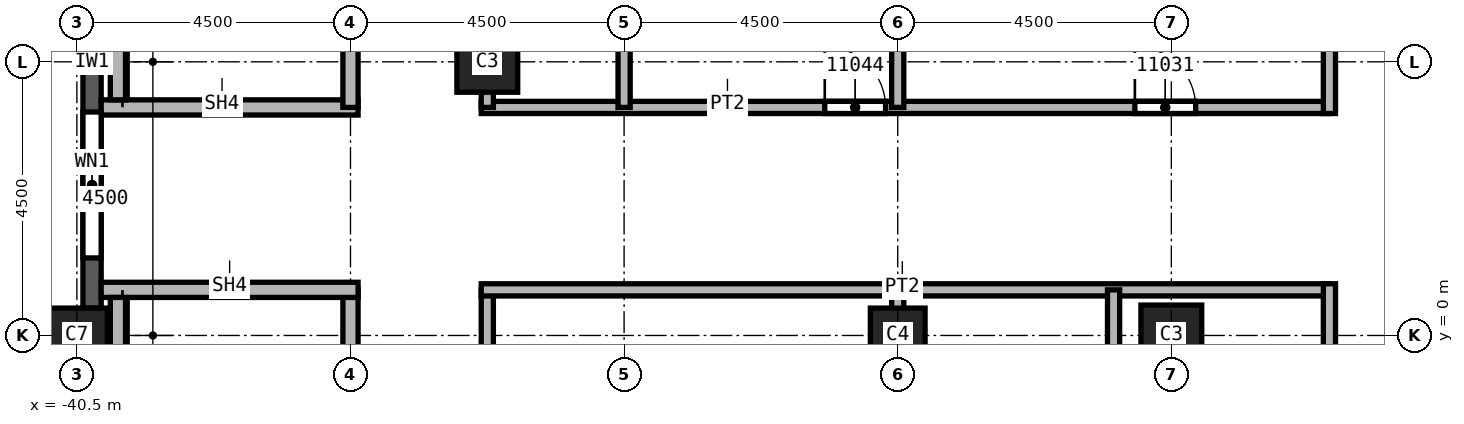
"""IFC4 building model, lengths in metres.
Left out: names, types, materials, properties, quantities, classifications, styles, units other than length and angle.
Written with IfcOpenShell. Run it as: python <this file> out.ifc"""

import sys

from ifc_helpers import new_model, si_unit, direction, frame, frame_2d, origin, origin_2d, place, context, subcontext, project, spatial, rectangle, extrude, element, fill, save


model = new_model("IFC4")
c1 = context("Model", 3, precision=1e-05, world=origin(), true_north=direction((0.0, 1.0)))
c2 = subcontext(c1, "Body", "Model", "MODEL_VIEW")
j1 = project(units=[si_unit("LENGTHUNIT", "METRE"), si_unit("PLANEANGLEUNIT", "RADIAN")], contexts=[c1])
p1 = place(None, origin())
s1 = spatial("IfcSite", under=j1, at=p1, CompositionType="ELEMENT")
p2 = place(p1, origin())
s2 = spatial("IfcBuilding", under=s1, at=p2, CompositionType="ELEMENT")
p3 = place(p2, frame((0.0, 0.0, 188.0)))
s3 = spatial("IfcBuildingStorey", under=s2, at=p3, CompositionType="ELEMENT", Elevation=188.0)
p4 = place(p3, frame((-40.5, 0.0, 0.0), z_axis=(0.0, 0.0, 1.0), x_axis=(0.0, 1.0, 0.0)))
e1 = element("IfcColumn", 1, at=p4, inside=s3, PredefinedType="COLUMN", context=c2, shape_type="SweptSolid", body=[
    extrude(rectangle(XDim=0.9, YDim=1.0, at=origin_2d()), origin(), (0.0, 0.0, 1.0), 3.72),
])
for number, where, z_axis, x_axis in (
    (2, (-33.75, 4.5, 0.0), (0.0, 0.0, 1.0), (1.0, 0.0, 0.0)),
    (3, (-22.5, 0.0, 0.0), (0.0, 0.0, 1.0), (1.0, 0.0, 0.0)),
):
    element("IfcColumn", number, at=place(p3, frame(where, z_axis=z_axis, x_axis=x_axis)), inside=s3, PredefinedType="COLUMN", context=c2, shape_type="SweptSolid", body=[
        extrude(rectangle(XDim=1.0, YDim=1.0, at=origin_2d()), origin(), (0.0, 0.0, 1.0), 3.72),
    ])
p5 = place(p3, frame((-27.0, 0.0, 0.0), z_axis=(0.0, 0.0, 1.0), x_axis=(1.0, 0.0, 0.0)))
e4 = element("IfcColumn", 4, at=p5, inside=s3, PredefinedType="COLUMN", context=c2, shape_type="SweptSolid", body=[
    extrude(rectangle(XDim=0.9, YDim=0.9, at=origin_2d()), origin(), (0.0, 0.0, 1.0), 3.72),
])
p6 = place(p3, frame((-40.25, 8.55, 0.0), z_axis=(0.0, 0.0, 1.0), x_axis=(0.0, -1.0, 0.0)))
e5 = element("IfcWall", 5, at=p6, inside=s3, PredefinedType="SOLIDWALL", context=c2, shape_type="SweptSolid", body=[
    extrude(rectangle(XDim=8.1, YDim=0.3, at=frame_2d((4.05, 0.0))), origin(), (0.0, 0.0, 1.0), 3.12),
])
p7 = place(p6, frame((0.825, 0.0, 0.8)))
e6 = element("IfcOpeningElement", 6, at=p7, cuts=e5, PredefinedType="OPENING", context=c2, shape_type="SweptSolid", body=[
    extrude(rectangle(XDim=2.4, YDim=1.95, at=frame_2d((1.2, 0.975))), frame((0.0, 0.15, 0.0), z_axis=(0.0, -1.0, 0.0), x_axis=(1.0, 0.0, 0.0)), (0.0, 0.0, 1.0), 0.3),
])
p8 = place(p6, frame((4.875, 0.0, 0.8)))
e7 = element("IfcOpeningElement", 7, at=p8, cuts=e5, PredefinedType="OPENING", context=c2, shape_type="SweptSolid", body=[
    extrude(rectangle(XDim=2.4, YDim=1.95, at=frame_2d((1.2, 0.975))), frame((0.0, 0.15, 0.0), z_axis=(0.0, -1.0, 0.0), x_axis=(1.0, 0.0, 0.0)), (0.0, 0.0, 1.0), 0.3),
])
p9 = place(p3, frame((-33.85, 3.75, 0.0), z_axis=(0.0, 0.0, 1.0), x_axis=(1.0, 0.0, 0.0)))
e8 = element("IfcWall", 8, at=p9, inside=s3, PredefinedType="PARTITIONING", context=c2, shape_type="SweptSolid", body=[
    extrude(rectangle(XDim=13.95, YDim=0.2, at=frame_2d((6.975, 0.0))), origin(), (0.0, 0.0, 1.0), 3.72),
])
p10 = place(p9, frame((10.75, 0.0, 0.0)))
e9 = element("IfcOpeningElement", 9, at=p10, cuts=e8, PredefinedType="OPENING", context=c2, shape_type="SweptSolid", body=[
    extrude(rectangle(XDim=1.0, YDim=2.1, at=frame_2d((0.5, 1.05))), frame((0.0, 0.1, 0.0), z_axis=(0.0, -1.0, 0.0), x_axis=(1.0, 0.0, 0.0)), (0.0, 0.0, 1.0), 0.2),
])
p11 = place(p9, frame((5.65, 0.0, 0.0)))
e10 = element("IfcOpeningElement", 10, at=p11, cuts=e8, PredefinedType="OPENING", context=c2, shape_type="SweptSolid", body=[
    extrude(rectangle(XDim=1.0, YDim=2.1, at=frame_2d((0.5, 1.05))), frame((0.0, 0.1, 0.0), z_axis=(0.0, -1.0, 0.0), x_axis=(1.0, 0.0, 0.0)), (0.0, 0.0, 1.0), 0.2),
])
p12 = place(p3, frame((-33.75, 0.75, 0.0), z_axis=(0.0, 0.0, 1.0), x_axis=(0.0, -1.0, 0.0)))
e11 = element("IfcWall", 11, at=p12, inside=s3, PredefinedType="PARTITIONING", context=c2, shape_type="SweptSolid", body=[
    extrude(rectangle(XDim=18.35, YDim=0.2, at=frame_2d((9.175, 0.0))), origin(), (0.0, 0.0, 1.0), 3.72),
])
p13 = place(p12, frame((3.25, 0.0, 0.0)))
e12 = element("IfcOpeningElement", 12, at=p13, cuts=e11, PredefinedType="OPENING", context=c2, shape_type="SweptSolid", body=[
    extrude(rectangle(XDim=1.0, YDim=2.1, at=frame_2d((0.5, 1.05))), frame((0.0, 0.1, 0.0), z_axis=(0.0, -1.0, 0.0), x_axis=(1.0, 0.0, 0.0)), (0.0, 0.0, 1.0), 0.2),
])
p14 = place(p3, frame((-33.75, 11.25, 0.0), z_axis=(0.0, 0.0, 1.0), x_axis=(0.0, -1.0, 0.0)))
e13 = element("IfcWall", 13, at=p14, inside=s3, PredefinedType="PARTITIONING", context=c2, shape_type="SweptSolid", body=[
    extrude(rectangle(XDim=7.5, YDim=0.2, at=frame_2d((3.75, 0.0))), origin(), (0.0, 0.0, 1.0), 3.72),
])
p15 = place(p14, frame((4.9, 0.0, 0.0)))
e14 = element("IfcOpeningElement", 14, at=p15, cuts=e13, PredefinedType="OPENING", context=c2, shape_type="SweptSolid", body=[
    extrude(rectangle(XDim=1.0, YDim=2.1, at=frame_2d((0.5, 1.05))), frame((0.0, 0.1, 0.0), z_axis=(0.0, -1.0, 0.0), x_axis=(1.0, 0.0, 0.0)), (0.0, 0.0, 1.0), 0.2),
])
p16 = place(p3, frame((-31.5, 17.5, 0.0), z_axis=(0.0, 0.0, 1.0), x_axis=(0.0, -1.0, 0.0)))
e15 = element("IfcWall", 15, at=p16, inside=s3, PredefinedType="PARTITIONING", context=c2, shape_type="SweptSolid", body=[
    extrude(rectangle(XDim=13.75, YDim=0.2, at=frame_2d((6.875, 0.0))), origin(), (0.0, 0.0, 1.0), 3.72),
])
p17 = place(p3, frame((-27.0, -6.75, 0.0), z_axis=(0.0, 0.0, 1.0), x_axis=(0.0, 1.0, 0.0)))
e16 = element("IfcWall", 16, at=p17, inside=s3, PredefinedType="PARTITIONING", context=c2, shape_type="SweptSolid", body=[
    extrude(rectangle(XDim=7.5, YDim=0.2, at=frame_2d((3.75, 0.0))), origin(), (0.0, 0.0, 1.0), 3.72),
])
p18 = place(p3, frame((-27.0, 3.75, 0.0), z_axis=(0.0, 0.0, 1.0), x_axis=(0.0, 1.0, 0.0)))
e17 = element("IfcWall", 17, at=p18, inside=s3, PredefinedType="PARTITIONING", context=c2, shape_type="SweptSolid", body=[
    extrude(rectangle(XDim=13.75, YDim=0.2, at=frame_2d((6.875, 0.0))), origin(), (0.0, 0.0, 1.0), 3.72),
])
p19 = place(p3, frame((-19.9, 0.75, 0.0), z_axis=(0.0, 0.0, 1.0), x_axis=(-1.0, 0.0, 0.0)))
e18 = element("IfcWall", 18, at=p19, inside=s3, PredefinedType="PARTITIONING", context=c2, shape_type="SweptSolid", body=[
    extrude(rectangle(XDim=13.95, YDim=0.2, at=frame_2d((6.975, 0.0))), origin(), (0.0, 0.0, 1.0), 3.72),
])
p20 = place(p3, frame((-23.45, -6.75, 0.0), z_axis=(0.0, 0.0, 1.0), x_axis=(0.0, 1.0, 0.0)))
e19 = element("IfcWall", 19, at=p20, inside=s3, PredefinedType="PARTITIONING", context=c2, shape_type="SweptSolid", body=[
    extrude(rectangle(XDim=7.5, YDim=0.2, at=frame_2d((3.75, 0.0))), origin(), (0.0, 0.0, 1.0), 3.72),
])
p21 = place(p20, frame((4.9, 0.0, 0.0)))
e20 = element("IfcOpeningElement", 20, at=p21, cuts=e19, PredefinedType="OPENING", context=c2, shape_type="SweptSolid", body=[
    extrude(rectangle(XDim=1.0, YDim=2.1, at=frame_2d((0.5, 1.05))), frame((0.0, 0.1, 0.0), z_axis=(0.0, -1.0, 0.0), x_axis=(1.0, 0.0, 0.0)), (0.0, 0.0, 1.0), 0.2),
])
p22 = place(p3, frame((-19.9, -22.4, 0.0), z_axis=(0.0, 0.0, 1.0), x_axis=(0.0, 1.0, 0.0)))
e21 = element("IfcWall", 21, at=p22, inside=s3, PredefinedType="PARTITIONING", context=c2, shape_type="SweptSolid", body=[
    extrude(rectangle(XDim=23.25, YDim=0.2, at=frame_2d((11.625, 0.0))), origin(), (0.0, 0.0, 1.0), 3.72),
])
p23 = place(p22, frame((1.9, 0.0, 0.0)))
e22 = element("IfcOpeningElement", 22, at=p23, cuts=e21, PredefinedType="OPENING", context=c2, shape_type="SweptSolid", body=[
    extrude(rectangle(XDim=1.0, YDim=2.1, at=frame_2d((0.5, 1.05))), frame((0.0, 0.1, 0.0), z_axis=(0.0, -1.0, 0.0), x_axis=(1.0, 0.0, 0.0)), (0.0, 0.0, 1.0), 0.2),
])
p24 = place(p22, frame((8.75, 0.0, 0.0)))
e23 = element("IfcOpeningElement", 23, at=p24, cuts=e21, PredefinedType="OPENING", context=c2, shape_type="SweptSolid", body=[
    extrude(rectangle(XDim=1.0, YDim=2.1, at=frame_2d((0.5, 1.05))), frame((0.0, 0.1, 0.0), z_axis=(0.0, -1.0, 0.0), x_axis=(1.0, 0.0, 0.0)), (0.0, 0.0, 1.0), 0.2),
])
p25 = place(p22, frame((16.25, 0.0, 0.0)))
e24 = element("IfcOpeningElement", 24, at=p25, cuts=e21, PredefinedType="OPENING", context=c2, shape_type="SweptSolid", body=[
    extrude(rectangle(XDim=1.0, YDim=2.1, at=frame_2d((0.5, 1.05))), frame((0.0, 0.1, 0.0), z_axis=(0.0, -1.0, 0.0), x_axis=(1.0, 0.0, 0.0)), (0.0, 0.0, 1.0), 0.2),
])
p26 = place(p3, frame((-19.9, 3.65, 0.0), z_axis=(0.0, 0.0, 1.0), x_axis=(0.0, 1.0, 0.0)))
e25 = element("IfcWall", 25, at=p26, inside=s3, PredefinedType="PARTITIONING", context=c2, shape_type="SweptSolid", body=[
    extrude(rectangle(XDim=9.95, YDim=0.2, at=frame_2d((4.975, 0.0))), origin(), (0.0, 0.0, 1.0), 3.72),
])
p27 = place(p26, frame((7.15, 0.0, 0.0)))
e26 = element("IfcOpeningElement", 26, at=p27, cuts=e25, PredefinedType="OPENING", context=c2, shape_type="SweptSolid", body=[
    extrude(rectangle(XDim=1.0, YDim=2.1, at=frame_2d((0.5, 1.05))), frame((0.0, 0.1, 0.0), z_axis=(0.0, -1.0, 0.0), x_axis=(1.0, 0.0, 0.0)), (0.0, 0.0, 1.0), 0.2),
])
p28 = place(p3, frame((-40.1, 3.75, 0.0), z_axis=(0.0, 0.0, 1.0), x_axis=(1.0, 0.0, 0.0)))
e27 = element("IfcWall", 27, at=p28, inside=s3, PredefinedType="SOLIDWALL", context=c2, shape_type="SweptSolid", body=[
    extrude(rectangle(XDim=4.225, YDim=0.25, at=frame_2d((2.113, 0.0))), origin(), (0.0, 0.0, 1.0), 3.72),
])
p29 = place(p3, frame((-36.0, 0.75, 0.0), z_axis=(0.0, 0.0, 1.0), x_axis=(0.0, -1.0, 0.0)))
e28 = element("IfcWall", 28, at=p29, inside=s3, PredefinedType="SOLIDWALL", context=c2, shape_type="SweptSolid", body=[
    extrude(rectangle(XDim=7.625, YDim=0.25, at=frame_2d((3.812, 0.0))), origin(), (0.0, 0.0, 1.0), 3.72),
])
p30 = place(p29, frame((5.95, 0.0, 0.0)))
e29 = element("IfcOpeningElement", 29, at=p30, cuts=e28, PredefinedType="OPENING", context=c2, shape_type="SweptSolid", body=[
    extrude(rectangle(XDim=1.2, YDim=2.1, at=frame_2d((0.6, 1.05))), frame((0.0, 0.125, 0.0), z_axis=(0.0, -1.0, 0.0), x_axis=(1.0, 0.0, 0.0)), (0.0, 0.0, 1.0), 0.25),
])
p31 = place(p3, frame((-36.0, 11.375, 0.0), z_axis=(0.0, 0.0, 1.0), x_axis=(0.0, -1.0, 0.0)))
e30 = element("IfcWall", 30, at=p31, inside=s3, PredefinedType="SOLIDWALL", context=c2, shape_type="SweptSolid", body=[
    extrude(rectangle(XDim=7.625, YDim=0.25, at=frame_2d((3.812, 0.0))), origin(), (0.0, 0.0, 1.0), 3.72),
])
p32 = place(p31, frame((0.4, 0.0, 0.0)))
e31 = element("IfcOpeningElement", 31, at=p32, cuts=e30, PredefinedType="OPENING", context=c2, shape_type="SweptSolid", body=[
    extrude(rectangle(XDim=1.2, YDim=2.1, at=frame_2d((0.6, 1.05))), frame((0.0, 0.125, 0.0), z_axis=(0.0, -1.0, 0.0), x_axis=(1.0, 0.0, 0.0)), (0.0, 0.0, 1.0), 0.25),
])
p33 = place(p3, frame((-35.875, 0.75, 0.0), z_axis=(0.0, 0.0, 1.0), x_axis=(-1.0, 0.0, 0.0)))
e32 = element("IfcWall", 32, at=p33, inside=s3, PredefinedType="SOLIDWALL", context=c2, shape_type="SweptSolid", body=[
    extrude(rectangle(XDim=4.225, YDim=0.25, at=frame_2d((2.113, 0.0))), origin(), (0.0, 0.0, 1.0), 3.72),
])
for number, where, z_axis, x_axis in (
    (33, (-39.825, 3.875, 0.0), (0.0, 0.0, 1.0), (0.0, 1.0, 0.0)),
    (34, (-39.825, -6.625, 0.0), (0.0, 0.0, 1.0), (0.0, 1.0, 0.0)),
):
    element("IfcWall", number, at=place(p3, frame(where, z_axis=z_axis, x_axis=x_axis)), inside=s3, PredefinedType="SOLIDWALL", context=c2, shape_type="SweptSolid", body=[
        extrude(rectangle(XDim=7.25, YDim=0.25, at=frame_2d((3.625, 0.0))), origin(), (0.0, 0.0, 1.0), 3.72),
    ])
p34 = place(p8, origin())
e35 = element("IfcWindow", 35, at=p34, inside=s3, PartitioningType="SINGLE_PANEL", PredefinedType="WINDOW", context=c2, shape_type="SweptSolid", body=[
    extrude(rectangle(XDim=2.4, YDim=1.95, at=frame_2d((1.2, 0.975))), frame((0.0, 0.03, 0.0), z_axis=(0.0, -1.0, 0.0), x_axis=(1.0, 0.0, 0.0)), (0.0, 0.0, 1.0), 0.06),
])
fill(e7, e35)
p35 = place(p10, origin())
e36 = element("IfcDoor", 36, at=p35, inside=s3, OperationType="SINGLE_SWING_RIGHT", PredefinedType="DOOR", context=c2, shape_type="SweptSolid", body=[
    extrude(rectangle(XDim=1.0, YDim=2.1, at=frame_2d((0.5, 1.05))), frame((0.0, 0.025, 0.0), z_axis=(0.0, -1.0, 0.0), x_axis=(1.0, 0.0, 0.0)), (0.0, 0.0, 1.0), 0.05),
])
fill(e9, e36)
p36 = place(p11, origin())
e37 = element("IfcDoor", 37, at=p36, inside=s3, OperationType="SINGLE_SWING_LEFT", PredefinedType="DOOR", context=c2, shape_type="SweptSolid", body=[
    extrude(rectangle(XDim=1.0, YDim=2.1, at=frame_2d((0.5, 1.05))), frame((0.0, 0.025, 0.0), z_axis=(0.0, -1.0, 0.0), x_axis=(1.0, 0.0, 0.0)), (0.0, 0.0, 1.0), 0.05),
])
fill(e10, e37)
save(model, sys.argv[1])
